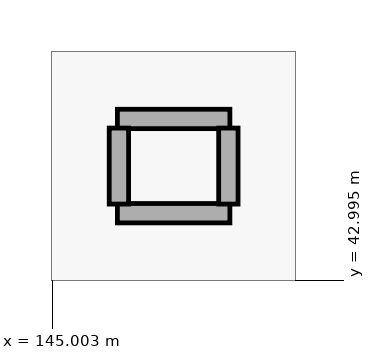
"""IFC4 building model, lengths in metres.
Left out: names, types, materials, properties, quantities, classifications, styles, units other than length and angle.
Written with IfcOpenShell. Run it as: python <this file> out.ifc"""

import sys

from ifc_helpers import new_model, si_unit, direction, frame, frame_2d, origin, place, context, subcontext, project, spatial, rectangle, extrude, element, save


model = new_model("IFC4")
c1 = context("Model", 3, precision=1e-05, world=origin(), true_north=direction((0.0, 1.0)))
c2 = subcontext(c1, "Body", "Model", "MODEL_VIEW")
j1 = project(units=[si_unit("LENGTHUNIT", "METRE"), si_unit("PLANEANGLEUNIT", "RADIAN")], contexts=[c1])
p1 = place(None, origin())
s1 = spatial("IfcSite", under=j1, at=p1, CompositionType="ELEMENT")
p2 = place(p1, origin())
s2 = spatial("IfcBuilding", under=s1, at=p2, CompositionType="ELEMENT")
p3 = place(p2, frame((0.0, 0.0, 15.6)))
s3 = spatial("IfcBuildingStorey", under=s2, at=p3, CompositionType="ELEMENT", Elevation=15.6)
for number, where, z_axis, x_axis in (
    (1, (145.86, 45.12, 0.0), (0.0, 0.0, 1.0), (1.0, 0.0, 0.0)),
    (2, (145.86, 43.88, 0.0), (0.0, 0.0, 1.0), (1.0, 0.0, 0.0)),
):
    element("IfcWall", number, at=place(p3, frame(where, z_axis=z_axis, x_axis=x_axis)), inside=s3, PredefinedType="PARTITIONING", context=c2, shape_type="SweptSolid", body=[
        extrude(rectangle(XDim=1.48, YDim=0.255, at=frame_2d((0.74, 0.0))), origin(), (0.0, 0.0, 1.0), 4.72),
    ])
for number, where, z_axis, x_axis in (
    (3, (145.88, 44.0, 0.0), (0.0, 0.0, 1.0), (0.0, 1.0, 0.0)),
    (4, (147.32, 44.0, 0.0), (0.0, 0.0, 1.0), (0.0, 1.0, 0.0)),
):
    element("IfcWall", number, at=place(p3, frame(where, z_axis=z_axis, x_axis=x_axis)), inside=s3, PredefinedType="PARTITIONING", context=c2, shape_type="SweptSolid", body=[
        extrude(rectangle(XDim=1.0, YDim=0.255, at=frame_2d((0.5, 0.0))), origin(), (0.0, 0.0, 1.0), 4.72),
    ])
save(model, sys.argv[1])
